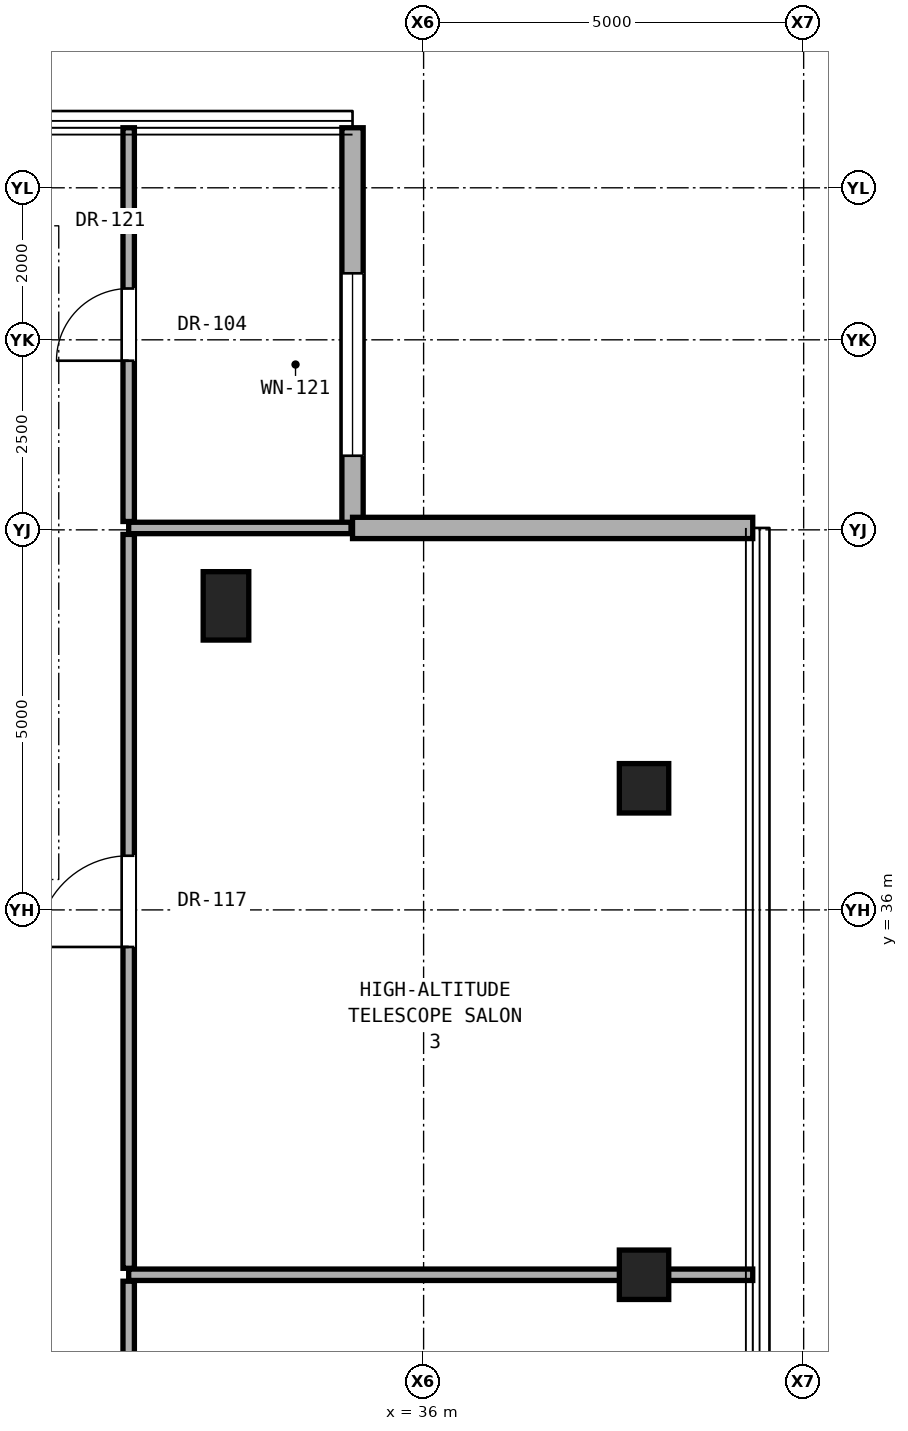
"""IFC4 building model, lengths in metres.
Left out: names, types, materials, properties, quantities, classifications, styles, units other than length and angle.
Written with IfcOpenShell. Run it as: python <this file> out.ifc"""

import sys

from ifc_helpers import new_model, si_unit, direction, frame, frame_2d, origin, origin_2d, place, context, subcontext, project, spatial, rectangle, hollow_rectangle, extrude, element, fill, save


model = new_model("IFC4")
c1 = context("Model", 3, precision=1e-05, world=origin(), true_north=direction((0.0, 1.0)))
c2 = subcontext(c1, "Body", "Model", "MODEL_VIEW")
j1 = project(units=[si_unit("LENGTHUNIT", "METRE"), si_unit("PLANEANGLEUNIT", "RADIAN")], contexts=[c1])
p1 = place(None, origin())
s1 = spatial("IfcSite", under=j1, at=p1, CompositionType="ELEMENT")
p2 = place(p1, origin())
s2 = spatial("IfcBuilding", under=s1, at=p2, CompositionType="ELEMENT")
p3 = place(p2, frame((0.0, 0.0, 249.1)))
s3 = spatial("IfcBuildingStorey", under=s2, at=p3, CompositionType="ELEMENT", Elevation=249.1)
for number, where, z_axis, x_axis in (
    (1, (38.9, 31.2, 0.0), (0.0, 0.0, 1.0), (1.0, 0.0, 0.0)),
    (2, (38.9, 37.6, 0.0), (0.0, 0.0, 1.0), (1.0, 0.0, 0.0)),
):
    element("IfcColumn", number, at=place(p3, frame(where, z_axis=z_axis, x_axis=x_axis)), inside=s3, PredefinedType="COLUMN", context=c2, shape_type="SweptSolid", body=[
        extrude(hollow_rectangle(XDim=0.65, YDim=0.65, WallThickness=0.036, at=origin_2d()), origin(), (0.0, 0.0, 1.0), 3.6),
    ])
p4 = place(p3, frame((33.4, 40.0, 0.0), z_axis=(0.0, 0.0, 1.0), x_axis=(1.0, 0.0, 0.0)))
e3 = element("IfcColumn", 3, at=p4, inside=s3, PredefinedType="PILASTER", context=c2, shape_type="SweptSolid", body=[
    extrude(rectangle(XDim=0.6, YDim=0.9, at=origin_2d()), origin(), (0.0, 0.0, 1.0), 3.6),
])
p5 = place(p3, frame((35.065, 41.025, 0.0), z_axis=(0.0, 0.0, 1.0), x_axis=(0.0, 1.0, 0.0)))
e4 = element("IfcWall", 4, at=p5, inside=s3, PredefinedType="SOLIDWALL", context=c2, shape_type="SweptSolid", body=[
    extrude(rectangle(XDim=5.265, YDim=0.28, at=frame_2d((2.633, 0.0))), origin(), (0.0, 0.0, 1.0), 3.38),
])
p6 = place(p5, frame((0.95, 0.0, 0.85)))
e5 = element("IfcOpeningElement", 5, at=p6, cuts=e4, PredefinedType="OPENING", context=c2, shape_type="SweptSolid", body=[
    extrude(rectangle(XDim=2.4, YDim=2.35, at=frame_2d((1.2, 1.175))), frame((0.0, 0.15, 0.0), z_axis=(0.0, -1.0, 0.0), x_axis=(1.0, 0.0, 0.0)), (0.0, 0.0, 1.0), 0.3),
])
p7 = place(p3, frame((40.33, 41.025, 0.0), z_axis=(0.0, 0.0, 1.0), x_axis=(-1.0, 0.0, 0.0)))
e6 = element("IfcWall", 6, at=p7, inside=s3, PredefinedType="SOLIDWALL", context=c2, shape_type="SweptSolid", body=[
    extrude(rectangle(XDim=5.265, YDim=0.28, at=frame_2d((2.633, 0.0))), origin(), (0.0, 0.0, 1.0), 3.38),
])
p8 = place(p3, frame((32.12, 31.2, 0.0), z_axis=(0.0, 0.0, 1.0), x_axis=(1.0, 0.0, 0.0)))
e7 = element("IfcWall", 7, at=p8, inside=s3, PredefinedType="PARTITIONING", context=c2, shape_type="SweptSolid", body=[
    extrude(rectangle(XDim=8.21, YDim=0.15, at=frame_2d((4.105, 0.0))), origin(), (0.0, 0.0, 1.0), 2.619),
])
p9 = place(p3, frame((32.12, 41.025, 0.0), z_axis=(0.0, 0.0, 1.0), x_axis=(1.0, 0.0, 0.0)))
e8 = element("IfcWall", 8, at=p9, inside=s3, PredefinedType="PARTITIONING", context=c2, shape_type="SweptSolid", body=[
    extrude(rectangle(XDim=2.925, YDim=0.15, at=frame_2d((1.462, 0.0))), origin(), (0.0, 0.0, 1.0), 3.4),
])
p10 = place(p3, frame((32.12, 24.885, 0.0), z_axis=(0.0, 0.0, 1.0), x_axis=(0.0, 1.0, 0.0)))
e9 = element("IfcWall", 9, at=p10, inside=s3, PredefinedType="PARTITIONING", context=c2, shape_type="SweptSolid", body=[
    extrude(rectangle(XDim=6.23, YDim=0.15, at=frame_2d((3.115, 0.0))), origin(), (0.0, 0.0, 1.0), 2.696),
])
p11 = place(p10, frame((2.515, 0.0, 0.0)))
e10 = element("IfcOpeningElement", 10, at=p11, cuts=e9, PredefinedType="OPENING", context=c2, shape_type="SweptSolid", body=[
    extrude(rectangle(XDim=1.2, YDim=2.25, at=frame_2d((0.6, 1.125))), frame((0.0, 0.085, 0.0), z_axis=(0.0, -1.0, 0.0), x_axis=(1.0, 0.0, 0.0)), (0.0, 0.0, 1.0), 0.17),
])
p12 = place(p3, frame((32.12, 31.285, 0.0), z_axis=(0.0, 0.0, 1.0), x_axis=(0.0, 1.0, 0.0)))
e11 = element("IfcWall", 11, at=p12, inside=s3, PredefinedType="PARTITIONING", context=c2, shape_type="SweptSolid", body=[
    extrude(rectangle(XDim=9.655, YDim=0.15, at=frame_2d((4.828, 0.0))), origin(), (0.0, 0.0, 1.0), 2.696),
])
p13 = place(p12, frame((4.228, 0.0, 0.0)))
e12 = element("IfcOpeningElement", 12, at=p13, cuts=e11, PredefinedType="OPENING", context=c2, shape_type="SweptSolid", body=[
    extrude(rectangle(XDim=1.2, YDim=2.25, at=frame_2d((0.6, 1.125))), frame((0.0, 0.085, 0.0), z_axis=(0.0, -1.0, 0.0), x_axis=(1.0, 0.0, 0.0)), (0.0, 0.0, 1.0), 0.17),
])
p14 = place(p3, frame((32.12, 41.11, 0.0), z_axis=(0.0, 0.0, 1.0), x_axis=(0.0, 1.0, 0.0)))
e13 = element("IfcWall", 13, at=p14, inside=s3, PredefinedType="PARTITIONING", context=c2, shape_type="SweptSolid", body=[
    extrude(rectangle(XDim=5.18, YDim=0.15, at=frame_2d((2.59, 0.0))), origin(), (0.0, 0.0, 1.0), 3.4),
])
p15 = place(p14, frame((2.115, 0.0, 0.0)))
e14 = element("IfcOpeningElement", 14, at=p15, cuts=e13, PredefinedType="OPENING", context=c2, shape_type="SweptSolid", body=[
    extrude(rectangle(XDim=0.95, YDim=2.15, at=frame_2d((0.475, 1.075))), frame((0.0, 0.085, 0.0), z_axis=(0.0, -1.0, 0.0), x_axis=(1.0, 0.0, 0.0)), (0.0, 0.0, 1.0), 0.17),
])
p16 = place(p6, origin())
e15 = element("IfcWindow", 15, at=p16, inside=s3, PartitioningType="SINGLE_PANEL", PredefinedType="WINDOW", context=c2, shape_type="SweptSolid", body=[
    extrude(rectangle(XDim=2.4, YDim=2.35, at=frame_2d((1.2, 1.175))), frame((0.0, 0.03, 0.0), z_axis=(0.0, -1.0, 0.0), x_axis=(1.0, 0.0, 0.0)), (0.0, 0.0, 1.0), 0.06),
])
fill(e5, e15)
p17 = place(p13, origin())
e16 = element("IfcDoor", 16, at=p17, inside=s3, OperationType="SINGLE_SWING_LEFT", PredefinedType="DOOR", context=c2, shape_type="SweptSolid", body=[
    extrude(rectangle(XDim=1.2, YDim=2.25, at=frame_2d((0.6, 1.125))), frame((0.0, 0.025, 0.0), z_axis=(0.0, -1.0, 0.0), x_axis=(1.0, 0.0, 0.0)), (0.0, 0.0, 1.0), 0.05),
])
fill(e12, e16)
p18 = place(p15, origin())
e17 = element("IfcDoor", 17, at=p18, inside=s3, OperationType="SINGLE_SWING_LEFT", PredefinedType="DOOR", context=c2, shape_type="SweptSolid", body=[
    extrude(rectangle(XDim=0.95, YDim=2.15, at=frame_2d((0.475, 1.075))), frame((0.0, 0.025, 0.0), z_axis=(0.0, -1.0, 0.0), x_axis=(1.0, 0.0, 0.0)), (0.0, 0.0, 1.0), 0.05),
])
fill(e14, e17)
save(model, sys.argv[1])
